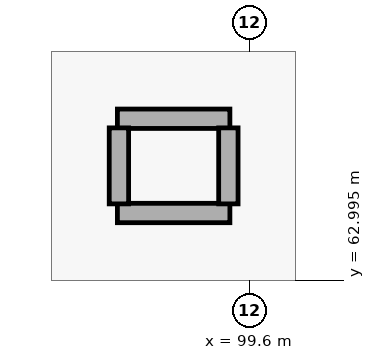
"""IFC4 building model, lengths in metres.
Left out: names, types, materials, properties, quantities, classifications, styles, units other than length and angle.
Written with IfcOpenShell. Run it as: python <this file> out.ifc"""

import sys

from ifc_helpers import new_model, si_unit, direction, frame, frame_2d, origin, place, context, subcontext, project, spatial, rectangle, extrude, element, save


model = new_model("IFC4")
c1 = context("Model", 3, precision=1e-05, world=origin(), true_north=direction((0.0, 1.0)))
c2 = subcontext(c1, "Body", "Model", "MODEL_VIEW")
j1 = project(units=[si_unit("LENGTHUNIT", "METRE"), si_unit("PLANEANGLEUNIT", "RADIAN")], contexts=[c1])
p1 = place(None, origin())
s1 = spatial("IfcSite", under=j1, at=p1, CompositionType="ELEMENT")
p2 = place(p1, origin())
s2 = spatial("IfcBuilding", under=s1, at=p2, CompositionType="ELEMENT")
p3 = place(p2, frame((0.0, 0.0, 10.5)))
s3 = spatial("IfcBuildingStorey", under=s2, at=p3, CompositionType="ELEMENT", Elevation=10.5)
for number, where, z_axis, x_axis in (
    (1, (97.86, 65.12, 0.0), (0.0, 0.0, 1.0), (1.0, 0.0, 0.0)),
    (2, (97.86, 63.88, 0.0), (0.0, 0.0, 1.0), (1.0, 0.0, 0.0)),
):
    element("IfcWall", number, at=place(p3, frame(where, z_axis=z_axis, x_axis=x_axis)), inside=s3, PredefinedType="PARTITIONING", context=c2, shape_type="SweptSolid", body=[
        extrude(rectangle(XDim=1.48, YDim=0.255, at=frame_2d((0.74, 0.0))), origin(), (0.0, 0.0, 1.0), 4.1),
    ])
p4 = place(p3, frame((97.88, 64.0, 0.0), z_axis=(0.0, 0.0, 1.0), x_axis=(0.0, 1.0, 0.0)))
e3 = element("IfcWall", 3, at=p4, inside=s3, PredefinedType="PARTITIONING", context=c2, shape_type="SweptSolid", body=[
    extrude(rectangle(XDim=1.0, YDim=0.255, at=frame_2d((0.5, 0.0))), origin(), (0.0, 0.0, 1.0), 4.72),
])
p5 = place(p3, frame((99.32, 64.0, 0.0), z_axis=(0.0, 0.0, 1.0), x_axis=(0.0, 1.0, 0.0)))
e4 = element("IfcWall", 4, at=p5, inside=s3, PredefinedType="PARTITIONING", context=c2, shape_type="SweptSolid", body=[
    extrude(rectangle(XDim=1.0, YDim=0.255, at=frame_2d((0.5, 0.0))), origin(), (0.0, 0.0, 1.0), 4.1),
])
save(model, sys.argv[1])
